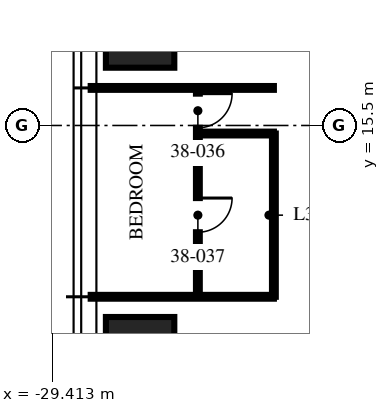
"""IFC4 building model, lengths in metres.
Left out: names, types, materials, properties, quantities, classifications, styles, units other than length and angle.
Written with IfcOpenShell. Run it as: python <this file> out.ifc"""

import sys

from ifc_helpers import new_model, si_unit, direction, frame, frame_2d, origin, origin_2d, place, context, subcontext, project, spatial, rectangle, extrude, element, fill, save


model = new_model("IFC4")
c1 = context("Model", 3, precision=1e-05, world=origin(), true_north=direction((0.0, 1.0)))
c2 = subcontext(c1, "Body", "Model", "MODEL_VIEW")
j1 = project(units=[si_unit("LENGTHUNIT", "METRE"), si_unit("PLANEANGLEUNIT", "RADIAN")], contexts=[c1])
p1 = place(None, origin())
s1 = spatial("IfcSite", under=j1, at=p1, CompositionType="ELEMENT")
p2 = place(p1, origin())
s2 = spatial("IfcBuilding", under=s1, at=p2, CompositionType="ELEMENT")
p3 = place(p2, frame((0.0, 0.0, 152.25)))
s3 = spatial("IfcBuildingStorey", under=s2, at=p3, CompositionType="ELEMENT", Elevation=152.25)
for number, where, z_axis, x_axis in (
    (1, (-27.1, 9.16, 0.0), (0.0, 0.0, 1.0), (0.0, 1.0, 0.0)),
    (2, (-27.1, 18.32, 0.0), (0.0, 0.0, 1.0), (0.0, 1.0, 0.0)),
):
    element("IfcColumn", number, at=place(p3, frame(where, z_axis=z_axis, x_axis=x_axis)), inside=s3, PredefinedType="COLUMN", context=c2, shape_type="SweptSolid", body=[
        extrude(rectangle(XDim=2.6, YDim=1.8, at=origin_2d()), origin(), (0.0, 0.0, 1.0), 3.75),
    ])
for number, where, z_axis, x_axis in (
    (3, (-23.58, 16.488, 0.0), (0.0, 0.0, 1.0), (-1.0, 0.0, 0.0)),
    (4, (-23.58, 10.992, 0.0), (0.0, 0.0, 1.0), (-1.0, 0.0, 0.0)),
):
    element("IfcWall", number, at=place(p3, frame(where, z_axis=z_axis, x_axis=x_axis)), inside=s3, PredefinedType="PARTITIONING", context=c2, shape_type="SweptSolid", body=[
        extrude(rectangle(XDim=4.82, YDim=0.1, at=frame_2d((2.41, 0.0))), origin(), (0.0, 0.0, 1.0), 2.81),
    ])
p4 = place(p3, frame((-25.58, 16.488, 0.0), z_axis=(0.0, 0.0, 1.0), x_axis=(0.0, -1.0, 0.0)))
e5 = element("IfcWall", 5, at=p4, inside=s3, PredefinedType="PARTITIONING", context=c2, shape_type="SweptSolid", body=[
    extrude(rectangle(XDim=5.496, YDim=0.1, at=frame_2d((2.748, 0.0))), origin(), (0.0, 0.0, 1.0), 2.81),
])
p5 = place(p4, frame((0.15, 0.0, 0.0)))
e6 = element("IfcOpeningElement", 6, at=p5, cuts=e5, PredefinedType="OPENING", context=c2, shape_type="SweptSolid", body=[
    extrude(rectangle(XDim=0.9, YDim=2.1, at=frame_2d((0.45, 1.05))), frame((0.0, 0.06, 0.0), z_axis=(0.0, -1.0, 0.0), x_axis=(1.0, 0.0, 0.0)), (0.0, 0.0, 1.0), 0.12),
])
p6 = place(p4, frame((2.898, 0.0, 0.0)))
e7 = element("IfcOpeningElement", 7, at=p6, cuts=e5, PredefinedType="OPENING", context=c2, shape_type="SweptSolid", body=[
    extrude(rectangle(XDim=0.9, YDim=2.1, at=frame_2d((0.45, 1.05))), frame((0.0, 0.06, 0.0), z_axis=(0.0, -1.0, 0.0), x_axis=(1.0, 0.0, 0.0)), (0.0, 0.0, 1.0), 0.12),
])
p7 = place(p3, frame((-23.58, 15.288, 0.0), z_axis=(0.0, 0.0, 1.0), x_axis=(-1.0, 0.0, 0.0)))
e8 = element("IfcWall", 8, at=p7, inside=s3, PredefinedType="PARTITIONING", context=c2, shape_type="SweptSolid", body=[
    extrude(rectangle(XDim=2.0, YDim=0.1, at=frame_2d((1.0, 0.0))), origin(), (0.0, 0.0, 1.0), 3.5),
])
p8 = place(p3, frame((-23.58, 15.288, 0.0), z_axis=(0.0, 0.0, 1.0), x_axis=(0.0, -1.0, 0.0)))
e9 = element("IfcWall", 9, at=p8, inside=s3, PredefinedType="PARTITIONING", context=c2, shape_type="SweptSolid", body=[
    extrude(rectangle(XDim=4.296, YDim=0.1, at=frame_2d((2.148, 0.0))), origin(), (0.0, 0.0, 1.0), 2.81),
])
p9 = place(p5, origin())
e10 = element("IfcDoor", 10, at=p9, inside=s3, OperationType="SINGLE_SWING_LEFT", PredefinedType="DOOR", context=c2, shape_type="SweptSolid", body=[
    extrude(rectangle(XDim=0.9, YDim=2.1, at=frame_2d((0.45, 1.05))), frame((0.0, 0.025, 0.0), z_axis=(0.0, -1.0, 0.0), x_axis=(1.0, 0.0, 0.0)), (0.0, 0.0, 1.0), 0.05),
])
fill(e6, e10)
p10 = place(p6, origin())
e11 = element("IfcDoor", 11, at=p10, inside=s3, OperationType="SINGLE_SWING_LEFT", PredefinedType="DOOR", context=c2, shape_type="SweptSolid", body=[
    extrude(rectangle(XDim=0.9, YDim=2.1, at=frame_2d((0.45, 1.05))), frame((0.0, 0.025, 0.0), z_axis=(0.0, -1.0, 0.0), x_axis=(1.0, 0.0, 0.0)), (0.0, 0.0, 1.0), 0.05),
])
fill(e7, e11)
save(model, sys.argv[1])
